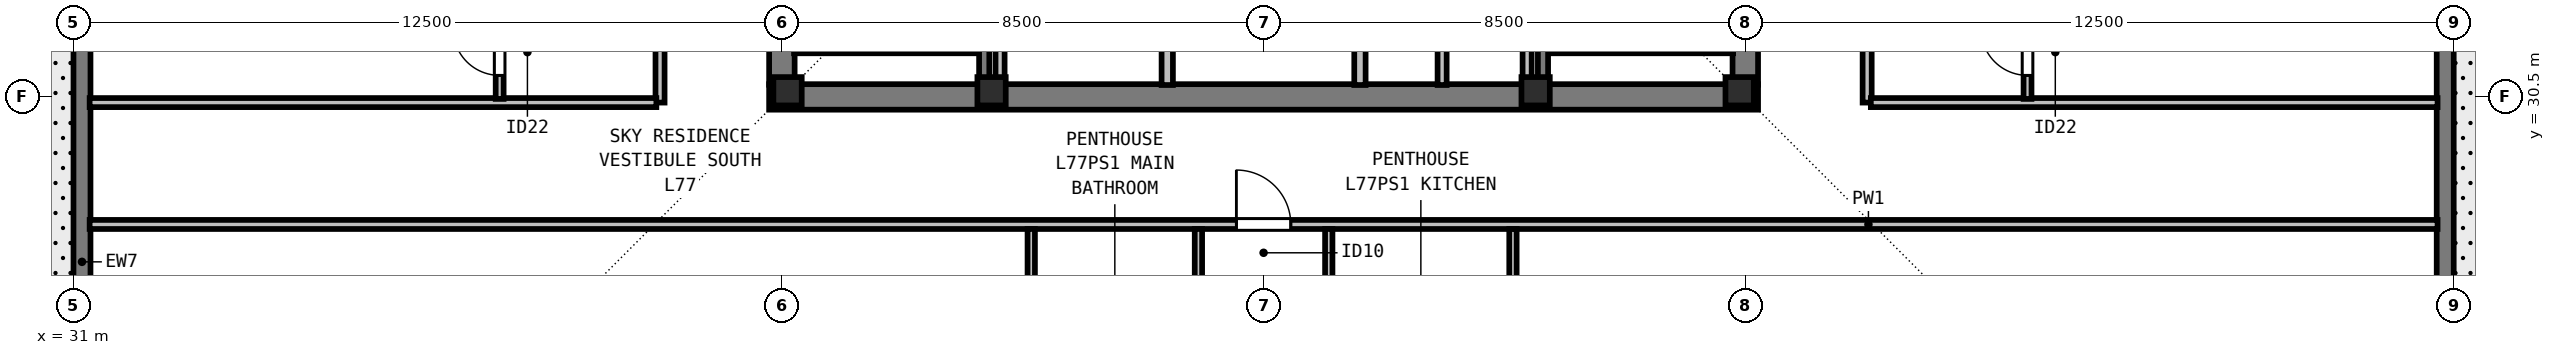
"""IFC4 building model, lengths in metres.
Left out: names, types, materials, properties, quantities, classifications, styles, units other than length and angle.
Written with IfcOpenShell. Run it as: python <this file> out.ifc"""

import sys

from ifc_helpers import new_model, si_unit, direction, frame, frame_2d, origin, origin_2d, place, context, subcontext, project, spatial, rectangle, i_section, extrude, element, fill, save


model = new_model("IFC4")
c1 = context("Model", 3, precision=1e-05, world=origin(), true_north=direction((0.0, 1.0)))
c2 = subcontext(c1, "Body", "Model", "MODEL_VIEW")
j1 = project(units=[si_unit("LENGTHUNIT", "METRE"), si_unit("PLANEANGLEUNIT", "RADIAN")], contexts=[c1])
p1 = place(None, origin())
s1 = spatial("IfcSite", under=j1, at=p1, CompositionType="ELEMENT")
p2 = place(p1, origin())
s2 = spatial("IfcBuilding", under=s1, at=p2, CompositionType="ELEMENT")
p3 = place(p2, frame((0.0, 0.0, 280.5)))
s3 = spatial("IfcBuildingStorey", under=s2, at=p3, CompositionType="ELEMENT", Elevation=280.5)
for number, where, z_axis, x_axis in (
    (1, (43.6, 30.6, 0.0), (0.0, 0.0, 1.0), (1.0, 0.0, 0.0)),
    (2, (47.2, 30.6, 0.0), (0.0, 0.0, 1.0), (1.0, 0.0, 0.0)),
    (3, (56.8, 30.6, 0.0), (0.0, 0.0, 1.0), (1.0, 0.0, 0.0)),
    (4, (60.4, 30.6, 0.0), (0.0, 0.0, 1.0), (1.0, 0.0, 0.0)),
):
    element("IfcColumn", number, at=place(p3, frame(where, z_axis=z_axis, x_axis=x_axis)), inside=s3, PredefinedType="COLUMN", context=c2, shape_type="SweptSolid", body=[
        extrude(i_section(OverallWidth=0.5, OverallDepth=0.5, WebThickness=0.028, FlangeThickness=0.045, at=origin_2d()), origin(), (0.0, 0.0, 1.0), 3.5),
    ])
p4 = place(p3, frame((31.15, 23.5, 0.0), z_axis=(0.0, 0.0, 1.0), x_axis=(0.0, 1.0, 0.0)))
e5 = element("IfcWall", 5, at=p4, inside=s3, PredefinedType="SOLIDWALL", context=c2, shape_type="SweptSolid", body=[
    extrude(rectangle(XDim=30.722, YDim=0.3, at=frame_2d((15.361, 0.0))), origin(), (0.0, 0.0, 1.0), 3.29),
])
p5 = place(p4, frame((8.331, 0.0, 0.8)))
e6 = element("IfcOpeningElement", 6, at=p5, cuts=e5, PredefinedType="OPENING", context=c2, shape_type="SweptSolid", body=[
    extrude(rectangle(XDim=1.65, YDim=1.758, at=frame_2d((0.825, 0.879))), frame((0.0, 0.16, 0.0), z_axis=(0.0, -1.0, 0.0), x_axis=(1.0, 0.0, 0.0)), (0.0, 0.0, 1.0), 0.32),
])
p6 = place(p4, frame((12.442, 0.0, 0.8)))
e7 = element("IfcOpeningElement", 7, at=p6, cuts=e5, PredefinedType="OPENING", context=c2, shape_type="SweptSolid", body=[
    extrude(rectangle(XDim=2.0, YDim=1.758, at=frame_2d((1.0, 0.879))), frame((0.0, 0.16, 0.0), z_axis=(0.0, -1.0, 0.0), x_axis=(1.0, 0.0, 0.0)), (0.0, 0.0, 1.0), 0.32),
])
p7 = place(p4, frame((17.304, 0.0, 0.8)))
e8 = element("IfcOpeningElement", 8, at=p7, cuts=e5, PredefinedType="OPENING", context=c2, shape_type="SweptSolid", body=[
    extrude(rectangle(XDim=1.65, YDim=1.758, at=frame_2d((0.825, 0.879))), frame((0.0, 0.16, 0.0), z_axis=(0.0, -1.0, 0.0), x_axis=(1.0, 0.0, 0.0)), (0.0, 0.0, 1.0), 0.32),
])
p8 = place(p4, frame((20.967, 0.0, 0.8)))
e9 = element("IfcOpeningElement", 9, at=p8, cuts=e5, PredefinedType="OPENING", context=c2, shape_type="SweptSolid", body=[
    extrude(rectangle(XDim=2.0, YDim=1.758, at=frame_2d((1.0, 0.879))), frame((0.0, 0.16, 0.0), z_axis=(0.0, -1.0, 0.0), x_axis=(1.0, 0.0, 0.0)), (0.0, 0.0, 1.0), 0.32),
])
p9 = place(p4, frame((26.63, 0.0, 0.8)))
e10 = element("IfcOpeningElement", 10, at=p9, cuts=e5, PredefinedType="OPENING", context=c2, shape_type="SweptSolid", body=[
    extrude(rectangle(XDim=0.9, YDim=1.75, at=frame_2d((0.45, 0.875))), frame((0.0, 0.16, 0.0), z_axis=(0.0, -1.0, 0.0), x_axis=(1.0, 0.0, 0.0)), (0.0, 0.0, 1.0), 0.32),
])
p10 = place(p3, frame((72.85, 54.5, 0.0), z_axis=(0.0, 0.0, 1.0), x_axis=(0.0, -1.0, 0.0)))
e11 = element("IfcWall", 11, at=p10, inside=s3, PredefinedType="SOLIDWALL", context=c2, shape_type="SweptSolid", body=[
    extrude(rectangle(XDim=30.722, YDim=0.3, at=frame_2d((15.361, 0.0))), origin(), (0.0, 0.0, 1.0), 3.29),
])
p11 = place(p10, frame((8.331, 0.0, 0.8)))
e12 = element("IfcOpeningElement", 12, at=p11, cuts=e11, PredefinedType="OPENING", context=c2, shape_type="SweptSolid", body=[
    extrude(rectangle(XDim=1.65, YDim=1.758, at=frame_2d((0.825, 0.879))), frame((0.0, 0.16, 0.0), z_axis=(0.0, -1.0, 0.0), x_axis=(1.0, 0.0, 0.0)), (0.0, 0.0, 1.0), 0.32),
])
p12 = place(p10, frame((11.593, 0.0, 0.8)))
e13 = element("IfcOpeningElement", 13, at=p12, cuts=e11, PredefinedType="OPENING", context=c2, shape_type="SweptSolid", body=[
    extrude(rectangle(XDim=2.0, YDim=1.758, at=frame_2d((1.0, 0.879))), frame((0.0, 0.16, 0.0), z_axis=(0.0, -1.0, 0.0), x_axis=(1.0, 0.0, 0.0)), (0.0, 0.0, 1.0), 0.32),
])
p13 = place(p10, frame((16.455, 0.0, 0.8)))
e14 = element("IfcOpeningElement", 14, at=p13, cuts=e11, PredefinedType="OPENING", context=c2, shape_type="SweptSolid", body=[
    extrude(rectangle(XDim=1.65, YDim=1.758, at=frame_2d((0.825, 0.879))), frame((0.0, 0.16, 0.0), z_axis=(0.0, -1.0, 0.0), x_axis=(1.0, 0.0, 0.0)), (0.0, 0.0, 1.0), 0.32),
])
p14 = place(p10, frame((20.967, 0.0, 0.8)))
e15 = element("IfcOpeningElement", 15, at=p14, cuts=e11, PredefinedType="OPENING", context=c2, shape_type="SweptSolid", body=[
    extrude(rectangle(XDim=2.0, YDim=1.758, at=frame_2d((1.0, 0.879))), frame((0.0, 0.16, 0.0), z_axis=(0.0, -1.0, 0.0), x_axis=(1.0, 0.0, 0.0)), (0.0, 0.0, 1.0), 0.32),
])
p15 = place(p3, frame((43.275, 30.5, 0.0), z_axis=(0.0, 0.0, 1.0), x_axis=(1.0, 0.0, 0.0)))
e16 = element("IfcWall", 16, at=p15, inside=s3, PredefinedType="SHEAR", context=c2, shape_type="SweptSolid", body=[
    extrude(rectangle(XDim=17.45, YDim=0.45, at=frame_2d((8.725, 0.0))), origin(), (0.0, 0.0, 1.0), 3.29),
])
for number, where, z_axis, x_axis in (
    (17, (43.5, 30.715, 0.0), (0.0, 0.0, 1.0), (0.0, 1.0, 0.0)),
    (18, (60.5, 30.715, 0.0), (0.0, 0.0, 1.0), (0.0, 1.0, 0.0)),
):
    element("IfcWall", number, at=place(p3, frame(where, z_axis=z_axis, x_axis=x_axis)), inside=s3, PredefinedType="SHEAR", context=c2, shape_type="SweptSolid", body=[
        extrude(rectangle(XDim=8.035, YDim=0.45, at=frame_2d((4.018, 0.0))), origin(), (0.0, 0.0, 1.0), 3.29),
    ])
p16 = place(p3, frame((50.3, 30.71, 0.0), z_axis=(0.0, 0.0, 1.0), x_axis=(0.0, 1.0, 0.0)))
e19 = element("IfcWall", 19, at=p16, inside=s3, PredefinedType="SOLIDWALL", context=c2, shape_type="SweptSolid", body=[
    extrude(rectangle(XDim=7.905, YDim=0.2, at=frame_2d((3.953, 0.0))), origin(), (0.0, 0.0, 1.0), 3.29),
])
p17 = place(p16, frame((1.39, 0.0, 0.0)))
e20 = element("IfcOpeningElement", 20, at=p17, cuts=e19, PredefinedType="OPENING", context=c2, shape_type="SweptSolid", body=[
    extrude(rectangle(XDim=0.9, YDim=2.12, at=frame_2d((0.45, 1.06))), frame((0.0, 0.11, 0.0), z_axis=(0.0, -1.0, 0.0), x_axis=(1.0, 0.0, 0.0)), (0.0, 0.0, 1.0), 0.22),
])
p18 = place(p16, frame((5.39, 0.0, 0.0)))
e21 = element("IfcOpeningElement", 21, at=p18, cuts=e19, PredefinedType="OPENING", context=c2, shape_type="SweptSolid", body=[
    extrude(rectangle(XDim=0.9, YDim=2.12, at=frame_2d((0.45, 1.06))), frame((0.0, 0.11, 0.0), z_axis=(0.0, -1.0, 0.0), x_axis=(1.0, 0.0, 0.0)), (0.0, 0.0, 1.0), 0.22),
])
p19 = place(p3, frame((53.7, 30.71, 0.0), z_axis=(0.0, 0.0, 1.0), x_axis=(0.0, 1.0, 0.0)))
e22 = element("IfcWall", 22, at=p19, inside=s3, PredefinedType="SOLIDWALL", context=c2, shape_type="SweptSolid", body=[
    extrude(rectangle(XDim=7.905, YDim=0.2, at=frame_2d((3.953, 0.0))), origin(), (0.0, 0.0, 1.0), 3.29),
])
p20 = place(p19, frame((2.14, 0.0, 0.0)))
e23 = element("IfcOpeningElement", 23, at=p20, cuts=e22, PredefinedType="OPENING", context=c2, shape_type="SweptSolid", body=[
    extrude(rectangle(XDim=0.95, YDim=2.12, at=frame_2d((0.475, 1.06))), frame((0.0, 0.11, 0.0), z_axis=(0.0, -1.0, 0.0), x_axis=(1.0, 0.0, 0.0)), (0.0, 0.0, 1.0), 0.22),
])
for number, where, z_axis, x_axis in (
    (24, (47.35, 30.71, 0.0), (0.0, 0.0, 1.0), (0.0, 1.0, 0.0)),
    (25, (56.65, 30.71, 0.0), (0.0, 0.0, 1.0), (0.0, 1.0, 0.0)),
):
    element("IfcWall", number, at=place(p3, frame(where, z_axis=z_axis, x_axis=x_axis)), inside=s3, PredefinedType="PARTITIONING", context=c2, shape_type="SweptSolid", body=[
        extrude(rectangle(XDim=7.905, YDim=0.16, at=frame_2d((3.953, 0.0))), origin(), (0.0, 0.0, 1.0), 3.29),
    ])
p21 = place(p3, frame((55.15, 30.71, 0.0), z_axis=(0.0, 0.0, 1.0), x_axis=(0.0, 1.0, 0.0)))
e26 = element("IfcWall", 26, at=p21, inside=s3, PredefinedType="PARTITIONING", context=c2, shape_type="SweptSolid", body=[
    extrude(rectangle(XDim=7.905, YDim=0.16, at=frame_2d((3.953, 0.0))), origin(), (0.0, 0.0, 1.0), 3.29),
])
p22 = place(p21, frame((3.54, 0.0, 0.0)))
e27 = element("IfcOpeningElement", 27, at=p22, cuts=e26, PredefinedType="OPENING", context=c2, shape_type="SweptSolid", body=[
    extrude(rectangle(XDim=0.85, YDim=2.12, at=frame_2d((0.425, 1.06))), frame((0.0, 0.09, 0.0), z_axis=(0.0, -1.0, 0.0), x_axis=(1.0, 0.0, 0.0)), (0.0, 0.0, 1.0), 0.18),
])
p23 = place(p3, frame((31.285, 28.25, 0.0), z_axis=(0.0, 0.0, 1.0), x_axis=(1.0, 0.0, 0.0)))
e28 = element("IfcWall", 28, at=p23, inside=s3, PredefinedType="PARTITIONING", context=c2, shape_type="SweptSolid", body=[
    extrude(rectangle(XDim=41.43, YDim=0.16, at=frame_2d((20.715, 0.0))), origin(), (0.0, 0.0, 1.0), 3.009),
])
p24 = place(p23, frame((20.235, 0.0, 0.0)))
e29 = element("IfcOpeningElement", 29, at=p24, cuts=e28, PredefinedType="OPENING", context=c2, shape_type="SweptSolid", body=[
    extrude(rectangle(XDim=0.96, YDim=2.18, at=frame_2d((0.48, 1.09))), frame((0.0, 0.09, 0.0), z_axis=(0.0, -1.0, 0.0), x_axis=(1.0, 0.0, 0.0)), (0.0, 0.0, 1.0), 0.18),
])
p25 = place(p3, frame((41.35, 30.4, 0.0), z_axis=(0.0, 0.0, 1.0), x_axis=(0.0, 1.0, 0.0)))
e30 = element("IfcWall", 30, at=p25, inside=s3, PredefinedType="PARTITIONING", context=c2, shape_type="SweptSolid", body=[
    extrude(rectangle(XDim=17.2, YDim=0.16, at=frame_2d((8.6, 0.0))), origin(), (0.0, 0.0, 1.0), 3.009),
])
p26 = place(p25, frame((8.12, 0.0, 0.0)))
e31 = element("IfcOpeningElement", 31, at=p26, cuts=e30, PredefinedType="OPENING", context=c2, shape_type="SweptSolid", body=[
    extrude(rectangle(XDim=0.96, YDim=2.18, at=frame_2d((0.48, 1.09))), frame((0.0, 0.09, 0.0), z_axis=(0.0, -1.0, 0.0), x_axis=(1.0, 0.0, 0.0)), (0.0, 0.0, 1.0), 0.18),
])
p27 = place(p3, frame((62.65, 30.4, 0.0), z_axis=(0.0, 0.0, 1.0), x_axis=(0.0, 1.0, 0.0)))
e32 = element("IfcWall", 32, at=p27, inside=s3, PredefinedType="PARTITIONING", context=c2, shape_type="SweptSolid", body=[
    extrude(rectangle(XDim=17.2, YDim=0.16, at=frame_2d((8.6, 0.0))), origin(), (0.0, 0.0, 1.0), 3.29),
])
p28 = place(p27, frame((8.12, 0.0, 0.0)))
e33 = element("IfcOpeningElement", 33, at=p28, cuts=e32, PredefinedType="OPENING", context=c2, shape_type="SweptSolid", body=[
    extrude(rectangle(XDim=0.96, YDim=2.18, at=frame_2d((0.48, 1.09))), frame((0.0, 0.09, 0.0), z_axis=(0.0, -1.0, 0.0), x_axis=(1.0, 0.0, 0.0)), (0.0, 0.0, 1.0), 0.18),
])
for number, where, z_axis, x_axis in (
    (34, (31.285, 30.4, 0.0), (0.0, 0.0, 1.0), (1.0, 0.0, 0.0)),
    (35, (62.715, 30.4, 0.0), (0.0, 0.0, 1.0), (1.0, 0.0, 0.0)),
):
    element("IfcWall", number, at=place(p3, frame(where, z_axis=z_axis, x_axis=x_axis)), inside=s3, PredefinedType="PARTITIONING", context=c2, shape_type="SweptSolid", body=[
        extrude(rectangle(XDim=10.0, YDim=0.16, at=frame_2d((5.0, 0.0))), origin(), (0.0, 0.0, 1.0), 3.29),
    ])
p29 = place(p3, frame((47.9, 25.42, 0.0), z_axis=(0.0, 0.0, 1.0), x_axis=(0.0, 1.0, 0.0)))
e36 = element("IfcWall", 36, at=p29, inside=s3, PredefinedType="PLUMBINGWALL", context=c2, shape_type="SweptSolid", body=[
    extrude(rectangle(XDim=2.75, YDim=0.13, at=frame_2d((1.375, 0.0))), origin(), (0.0, 0.0, 1.0), 3.29),
])
p30 = place(p3, frame((50.85, 25.42, 0.0), z_axis=(0.0, 0.0, 1.0), x_axis=(0.0, 1.0, 0.0)))
e37 = element("IfcWall", 37, at=p30, inside=s3, PredefinedType="PLUMBINGWALL", context=c2, shape_type="SweptSolid", body=[
    extrude(rectangle(XDim=2.75, YDim=0.13, at=frame_2d((1.375, 0.0))), origin(), (0.0, 0.0, 1.0), 3.29),
])
p31 = place(p30, frame((0.55, 0.0, 0.0)))
e38 = element("IfcOpeningElement", 38, at=p31, cuts=e37, PredefinedType="OPENING", context=c2, shape_type="SweptSolid", body=[
    extrude(rectangle(XDim=0.85, YDim=2.08, at=frame_2d((0.425, 1.04))), frame((0.0, 0.075, 0.0), z_axis=(0.0, -1.0, 0.0), x_axis=(1.0, 0.0, 0.0)), (0.0, 0.0, 1.0), 0.15),
])
p32 = place(p3, frame((56.4, 25.42, 0.0), z_axis=(0.0, 0.0, 1.0), x_axis=(0.0, 1.0, 0.0)))
e39 = element("IfcWall", 39, at=p32, inside=s3, PredefinedType="PLUMBINGWALL", context=c2, shape_type="SweptSolid", body=[
    extrude(rectangle(XDim=2.75, YDim=0.13, at=frame_2d((1.375, 0.0))), origin(), (0.0, 0.0, 1.0), 3.29),
])
p33 = place(p3, frame((53.15, 25.42, 0.0), z_axis=(0.0, 0.0, 1.0), x_axis=(0.0, 1.0, 0.0)))
e40 = element("IfcWall", 40, at=p33, inside=s3, PredefinedType="PLUMBINGWALL", context=c2, shape_type="SweptSolid", body=[
    extrude(rectangle(XDim=2.75, YDim=0.13, at=frame_2d((1.375, 0.0))), origin(), (0.0, 0.0, 1.0), 3.009),
])
p34 = place(p33, frame((0.55, 0.0, 0.0)))
e41 = element("IfcOpeningElement", 41, at=p34, cuts=e40, PredefinedType="OPENING", context=c2, shape_type="SweptSolid", body=[
    extrude(rectangle(XDim=0.88, YDim=2.1, at=frame_2d((0.44, 1.05))), frame((0.0, 0.075, 0.0), z_axis=(0.0, -1.0, 0.0), x_axis=(1.0, 0.0, 0.0)), (0.0, 0.0, 1.0), 0.15),
])
p35 = place(p3, frame((38.52, 30.465, 0.0), z_axis=(0.0, 0.0, 1.0), x_axis=(0.0, 1.0, 0.0)))
e42 = element("IfcWall", 42, at=p35, inside=s3, PredefinedType="PARTITIONING", context=c2, shape_type="SweptSolid", body=[
    extrude(rectangle(XDim=4.16, YDim=0.14, at=frame_2d((2.08, 0.0))), origin(), (0.0, 0.0, 1.0), 3.29),
])
p36 = place(p35, frame((0.415, 0.0, 0.0)))
e43 = element("IfcOpeningElement", 43, at=p36, cuts=e42, PredefinedType="OPENING", context=c2, shape_type="SweptSolid", body=[
    extrude(rectangle(XDim=0.82, YDim=2.1, at=frame_2d((0.41, 1.05))), frame((0.0, 0.08, 0.0), z_axis=(0.0, -1.0, 0.0), x_axis=(1.0, 0.0, 0.0)), (0.0, 0.0, 1.0), 0.16),
])
p37 = place(p3, frame((65.48, 30.465, 0.0), z_axis=(0.0, 0.0, 1.0), x_axis=(0.0, 1.0, 0.0)))
e44 = element("IfcWall", 44, at=p37, inside=s3, PredefinedType="PARTITIONING", context=c2, shape_type="SweptSolid", body=[
    extrude(rectangle(XDim=4.16, YDim=0.14, at=frame_2d((2.08, 0.0))), origin(), (0.0, 0.0, 1.0), 3.29),
])
p38 = place(p37, frame((0.415, 0.0, 0.0)))
e45 = element("IfcOpeningElement", 45, at=p38, cuts=e44, PredefinedType="OPENING", context=c2, shape_type="SweptSolid", body=[
    extrude(rectangle(XDim=0.82, YDim=2.1, at=frame_2d((0.41, 1.05))), frame((0.0, 0.08, 0.0), z_axis=(0.0, -1.0, 0.0), x_axis=(1.0, 0.0, 0.0)), (0.0, 0.0, 1.0), 0.16),
])
p39 = place(p3, frame((43.715, 31.36, 0.0), z_axis=(0.0, 0.0, 1.0), x_axis=(1.0, 0.0, 0.0)))
e46 = element("IfcWall", 46, at=p39, inside=s3, PredefinedType="SOLIDWALL", context=c2, shape_type="SweptSolid", body=[
    extrude(rectangle(XDim=3.28, YDim=0.18, at=frame_2d((1.64, 0.0))), origin(), (0.0, 0.0, 1.0), 3.29),
])
p40 = place(p3, frame((47.07, 38.78, 0.0), z_axis=(0.0, 0.0, 1.0), x_axis=(0.0, -1.0, 0.0)))
e47 = element("IfcWall", 47, at=p40, inside=s3, PredefinedType="SOLIDWALL", context=c2, shape_type="SweptSolid", body=[
    extrude(rectangle(XDim=8.067, YDim=0.18, at=frame_2d((4.034, 0.0))), origin(), (0.0, 0.0, 1.0), 3.29),
])
p41 = place(p3, frame((57.005, 31.36, 0.0), z_axis=(0.0, 0.0, 1.0), x_axis=(1.0, 0.0, 0.0)))
e48 = element("IfcWall", 48, at=p41, inside=s3, PredefinedType="SOLIDWALL", context=c2, shape_type="SweptSolid", body=[
    extrude(rectangle(XDim=3.28, YDim=0.18, at=frame_2d((1.64, 0.0))), origin(), (0.0, 0.0, 1.0), 3.29),
])
p42 = place(p3, frame((56.93, 38.78, 0.0), z_axis=(0.0, 0.0, 1.0), x_axis=(0.0, -1.0, 0.0)))
e49 = element("IfcWall", 49, at=p42, inside=s3, PredefinedType="SOLIDWALL", context=c2, shape_type="SweptSolid", body=[
    extrude(rectangle(XDim=8.067, YDim=0.18, at=frame_2d((4.034, 0.0))), origin(), (0.0, 0.0, 1.0), 3.29),
])
p43 = place(p24, origin())
e50 = element("IfcDoor", 50, at=p43, inside=s3, OperationType="SINGLE_SWING_LEFT", PredefinedType="DOOR", context=c2, shape_type="SweptSolid", body=[
    extrude(rectangle(XDim=0.96, YDim=2.18, at=frame_2d((0.48, 1.09))), frame((0.0, 0.025, 0.0), z_axis=(0.0, -1.0, 0.0), x_axis=(1.0, 0.0, 0.0)), (0.0, 0.0, 1.0), 0.05),
])
fill(e29, e50)
p44 = place(p36, origin())
e51 = element("IfcDoor", 51, at=p44, inside=s3, OperationType="SINGLE_SWING_RIGHT", PredefinedType="DOOR", context=c2, shape_type="SweptSolid", body=[
    extrude(rectangle(XDim=0.82, YDim=2.1, at=frame_2d((0.41, 1.05))), frame((0.0, 0.025, 0.0), z_axis=(0.0, -1.0, 0.0), x_axis=(1.0, 0.0, 0.0)), (0.0, 0.0, 1.0), 0.05),
])
fill(e43, e51)
p45 = place(p38, origin())
e52 = element("IfcDoor", 52, at=p45, inside=s3, OperationType="SINGLE_SWING_RIGHT", PredefinedType="DOOR", context=c2, shape_type="SweptSolid", body=[
    extrude(rectangle(XDim=0.82, YDim=2.1, at=frame_2d((0.41, 1.05))), frame((0.0, 0.025, 0.0), z_axis=(0.0, -1.0, 0.0), x_axis=(1.0, 0.0, 0.0)), (0.0, 0.0, 1.0), 0.05),
])
fill(e45, e52)
save(model, sys.argv[1])
